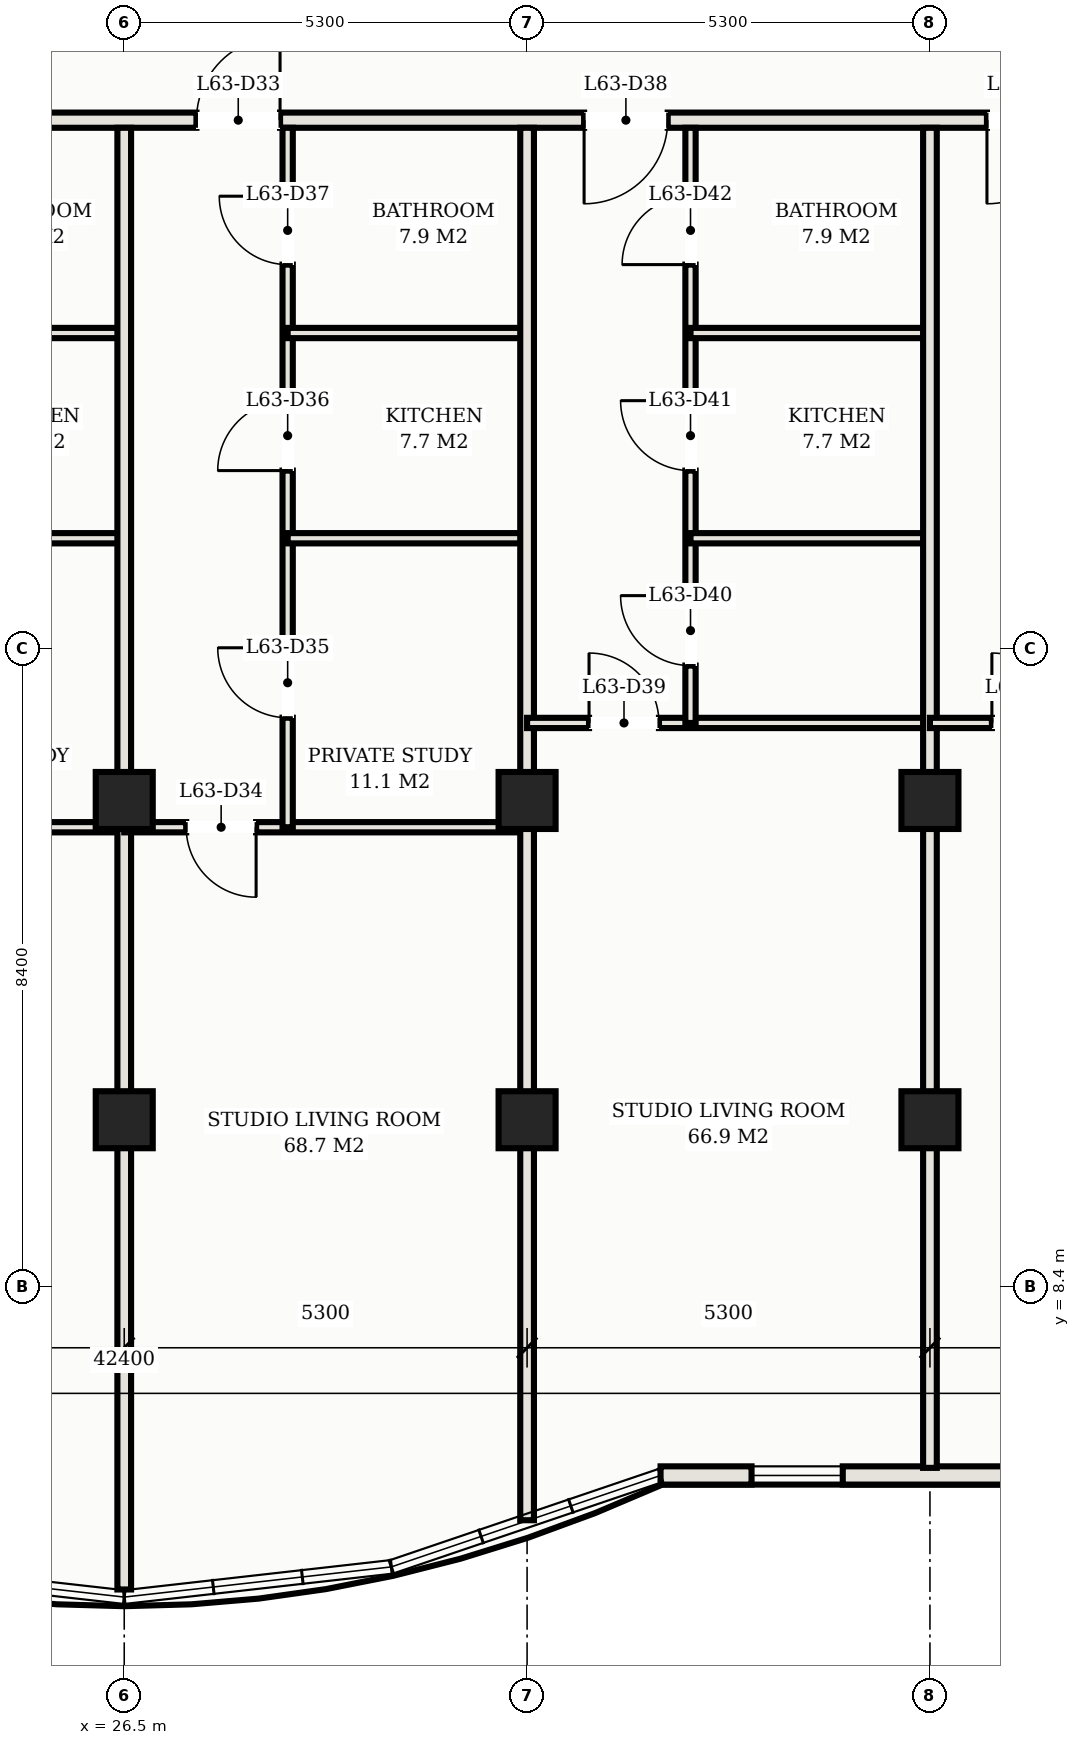
"""IFC4 building model, lengths in metres.
Left out: names, types, materials, properties, quantities, classifications, styles, units other than length and angle.
Written with IfcOpenShell. Run it as: python <this file> out.ifc"""

import sys

from ifc_helpers import new_model, si_unit, direction, frame, frame_2d, origin, origin_2d, place, context, subcontext, project, spatial, rectangle, hollow_rectangle, extrude, element, fill, save


model = new_model("IFC4")
c1 = context("Model", 3, precision=1e-05, world=origin(), true_north=direction((0.0, 1.0)))
c2 = subcontext(c1, "Body", "Model", "MODEL_VIEW")
j1 = project(units=[si_unit("LENGTHUNIT", "METRE"), si_unit("PLANEANGLEUNIT", "RADIAN")], contexts=[c1])
p1 = place(None, origin())
s1 = spatial("IfcSite", under=j1, at=p1, CompositionType="ELEMENT")
p2 = place(p1, origin())
s2 = spatial("IfcBuilding", under=s1, at=p2, CompositionType="ELEMENT")
p3 = place(p2, frame((0.0, 0.0, 229.7)))
s3 = spatial("IfcBuildingStorey", under=s2, at=p3, CompositionType="ELEMENT", Elevation=229.7)
for number, where, z_axis, x_axis in (
    (1, (26.5, 14.8, 0.0), (0.0, 0.0, 1.0), (1.0, 0.0, 0.0)),
    (2, (26.5, 10.6, 0.0), (0.0, 0.0, 1.0), (1.0, 0.0, 0.0)),
    (3, (31.8, 14.8, 0.0), (0.0, 0.0, 1.0), (1.0, 0.0, 0.0)),
    (4, (31.8, 10.6, 0.0), (0.0, 0.0, 1.0), (1.0, 0.0, 0.0)),
    (5, (37.1, 14.8, 0.0), (0.0, 0.0, 1.0), (1.0, 0.0, 0.0)),
    (6, (37.1, 10.6, 0.0), (0.0, 0.0, 1.0), (1.0, 0.0, 0.0)),
):
    element("IfcColumn", number, at=place(p3, frame(where, z_axis=z_axis, x_axis=x_axis)), inside=s3, PredefinedType="COLUMN", context=c2, shape_type="SweptSolid", body=[
        extrude(hollow_rectangle(XDim=0.75, YDim=0.75, WallThickness=0.025, at=origin_2d()), origin(), (0.0, 0.0, 1.0), 3.3),
    ])
p4 = place(p3, frame((33.556, 5.92, 0.0), z_axis=(0.0, 0.0, 1.0), x_axis=(1.0, 0.0, 0.0)))
e7 = element("IfcWall", 7, at=p4, inside=s3, PredefinedType="SOLIDWALL", context=c2, shape_type="SweptSolid", body=[
    extrude(rectangle(XDim=8.124, YDim=0.24, at=frame_2d((4.062, 0.0))), origin(), (0.0, 0.0, 1.0), 3.11),
])
p5 = place(p4, frame((4.909, 0.0, 0.75)))
e8 = element("IfcOpeningElement", 8, at=p5, cuts=e7, PredefinedType="OPENING", context=c2, shape_type="SweptSolid", body=[
    extrude(rectangle(XDim=1.8, YDim=1.7, at=frame_2d((0.9, 0.85))), frame((0.0, 0.13, 0.0), z_axis=(0.0, -1.0, 0.0), x_axis=(1.0, 0.0, 0.0)), (0.0, 0.0, 1.0), 0.26),
])
p6 = place(p4, frame((1.197, 0.0, 0.75)))
e9 = element("IfcOpeningElement", 9, at=p6, cuts=e7, PredefinedType="OPENING", context=c2, shape_type="SweptSolid", body=[
    extrude(rectangle(XDim=1.2, YDim=1.5, at=frame_2d((0.6, 0.75))), frame((0.0, 0.13, 0.0), z_axis=(0.0, -1.0, 0.0), x_axis=(1.0, 0.0, 0.0)), (0.0, 0.0, 1.0), 0.26),
])
p7 = place(p3, frame((6.72, 23.75, 0.0), z_axis=(0.0, 0.0, 1.0), x_axis=(1.0, 0.0, 0.0)))
e10 = element("IfcWall", 10, at=p7, inside=s3, PredefinedType="PARTITIONING", context=c2, shape_type="SweptSolid", body=[
    extrude(rectangle(XDim=39.56, YDim=0.2, at=frame_2d((19.78, 0.0))), origin(), (0.0, 0.0, 1.0), 2.43),
])
p8 = place(p7, frame((4.63, 0.0, 0.0)))
e11 = element("IfcOpeningElement", 11, at=p8, cuts=e10, PredefinedType="OPENING", context=c2, shape_type="SweptSolid", body=[
    extrude(rectangle(XDim=1.1, YDim=2.25, at=frame_2d((0.55, 1.125))), frame((0.0, 0.11, 0.0), z_axis=(0.0, -1.0, 0.0), x_axis=(1.0, 0.0, 0.0)), (0.0, 0.0, 1.0), 0.22),
])
p9 = place(p7, frame((9.93, 0.0, 0.0)))
e12 = element("IfcOpeningElement", 12, at=p9, cuts=e10, PredefinedType="OPENING", context=c2, shape_type="SweptSolid", body=[
    extrude(rectangle(XDim=1.1, YDim=2.25, at=frame_2d((0.55, 1.125))), frame((0.0, 0.11, 0.0), z_axis=(0.0, -1.0, 0.0), x_axis=(1.0, 0.0, 0.0)), (0.0, 0.0, 1.0), 0.22),
])
p10 = place(p7, frame((15.23, 0.0, 0.0)))
e13 = element("IfcOpeningElement", 13, at=p10, cuts=e10, PredefinedType="OPENING", context=c2, shape_type="SweptSolid", body=[
    extrude(rectangle(XDim=1.1, YDim=2.25, at=frame_2d((0.55, 1.125))), frame((0.0, 0.11, 0.0), z_axis=(0.0, -1.0, 0.0), x_axis=(1.0, 0.0, 0.0)), (0.0, 0.0, 1.0), 0.22),
])
p11 = place(p7, frame((20.73, 0.0, 0.0)))
e14 = element("IfcOpeningElement", 14, at=p11, cuts=e10, PredefinedType="OPENING", context=c2, shape_type="SweptSolid", body=[
    extrude(rectangle(XDim=1.1, YDim=2.25, at=frame_2d((0.55, 1.125))), frame((0.0, 0.11, 0.0), z_axis=(0.0, -1.0, 0.0), x_axis=(1.0, 0.0, 0.0)), (0.0, 0.0, 1.0), 0.22),
])
p12 = place(p7, frame((25.83, 0.0, 0.0)))
e15 = element("IfcOpeningElement", 15, at=p12, cuts=e10, PredefinedType="OPENING", context=c2, shape_type="SweptSolid", body=[
    extrude(rectangle(XDim=1.1, YDim=2.25, at=frame_2d((0.55, 1.125))), frame((0.0, 0.11, 0.0), z_axis=(0.0, -1.0, 0.0), x_axis=(1.0, 0.0, 0.0)), (0.0, 0.0, 1.0), 0.22),
])
p13 = place(p7, frame((31.13, 0.0, 0.0)))
e16 = element("IfcOpeningElement", 16, at=p13, cuts=e10, PredefinedType="OPENING", context=c2, shape_type="SweptSolid", body=[
    extrude(rectangle(XDim=1.1, YDim=2.25, at=frame_2d((0.55, 1.125))), frame((0.0, 0.11, 0.0), z_axis=(0.0, -1.0, 0.0), x_axis=(1.0, 0.0, 0.0)), (0.0, 0.0, 1.0), 0.22),
])
p14 = place(p7, frame((2.085, 0.0, 0.0)))
e17 = element("IfcOpeningElement", 17, at=p14, cuts=e10, PredefinedType="OPENING", context=c2, shape_type="SweptSolid", body=[
    extrude(rectangle(XDim=0.92, YDim=2.15, at=frame_2d((0.46, 1.075))), frame((0.0, 0.11, 0.0), z_axis=(0.0, -1.0, 0.0), x_axis=(1.0, 0.0, 0.0)), (0.0, 0.0, 1.0), 0.22),
])
p15 = place(p7, frame((36.555, 0.0, 0.0)))
e18 = element("IfcOpeningElement", 18, at=p15, cuts=e10, PredefinedType="OPENING", context=c2, shape_type="SweptSolid", body=[
    extrude(rectangle(XDim=0.92, YDim=2.15, at=frame_2d((0.46, 1.075))), frame((0.0, 0.11, 0.0), z_axis=(0.0, -1.0, 0.0), x_axis=(1.0, 0.0, 0.0)), (0.0, 0.0, 1.0), 0.22),
])
p16 = place(p3, frame((21.2, 14.448, 0.0), z_axis=(0.0, 0.0, 1.0), x_axis=(1.0, 0.0, 0.0)))
e19 = element("IfcWall", 19, at=p16, inside=s3, PredefinedType="PARTITIONING", context=c2, shape_type="SweptSolid", body=[
    extrude(rectangle(XDim=5.3, YDim=0.135, at=frame_2d((2.65, 0.0))), origin(), (0.0, 0.0, 1.0), 2.43),
])
p17 = place(p16, frame((0.815, 0.0, 0.0)))
e20 = element("IfcOpeningElement", 20, at=p17, cuts=e19, PredefinedType="OPENING", context=c2, shape_type="SweptSolid", body=[
    extrude(rectangle(XDim=0.92, YDim=2.15, at=frame_2d((0.46, 1.075))), frame((0.0, 0.078, 0.0), z_axis=(0.0, -1.0, 0.0), x_axis=(1.0, 0.0, 0.0)), (0.0, 0.0, 1.0), 0.155),
])
for number, where, z_axis, x_axis in (
    (21, (23.35, 18.25, 0.0), (0.0, 0.0, 1.0), (1.0, 0.0, 0.0)),
    (22, (23.35, 20.95, 0.0), (0.0, 0.0, 1.0), (1.0, 0.0, 0.0)),
):
    element("IfcWall", number, at=place(p3, frame(where, z_axis=z_axis, x_axis=x_axis)), inside=s3, PredefinedType="PARTITIONING", context=c2, shape_type="SweptSolid", body=[
        extrude(rectangle(XDim=3.15, YDim=0.135, at=frame_2d((1.575, 0.0))), origin(), (0.0, 0.0, 1.0), 2.43),
    ])
p18 = place(p3, frame((26.5, 4.42, 0.0), z_axis=(0.0, 0.0, 1.0), x_axis=(0.0, 1.0, 0.0)))
e23 = element("IfcWall", 23, at=p18, inside=s3, PredefinedType="PARTITIONING", context=c2, shape_type="SweptSolid", body=[
    extrude(rectangle(XDim=19.23, YDim=0.18, at=frame_2d((9.615, 0.0))), origin(), (0.0, 0.0, 1.0), 2.43),
])
p19 = place(p3, frame((26.5, 14.448, 0.0), z_axis=(0.0, 0.0, 1.0), x_axis=(1.0, 0.0, 0.0)))
e24 = element("IfcWall", 24, at=p19, inside=s3, PredefinedType="PARTITIONING", context=c2, shape_type="SweptSolid", body=[
    extrude(rectangle(XDim=5.3, YDim=0.135, at=frame_2d((2.65, 0.0))), origin(), (0.0, 0.0, 1.0), 2.43),
])
p20 = place(p19, frame((0.815, 0.0, 0.0)))
e25 = element("IfcOpeningElement", 25, at=p20, cuts=e24, PredefinedType="OPENING", context=c2, shape_type="SweptSolid", body=[
    extrude(rectangle(XDim=0.92, YDim=2.15, at=frame_2d((0.46, 1.075))), frame((0.0, 0.078, 0.0), z_axis=(0.0, -1.0, 0.0), x_axis=(1.0, 0.0, 0.0)), (0.0, 0.0, 1.0), 0.155),
])
p21 = place(p3, frame((28.65, 14.448, 0.0), z_axis=(0.0, 0.0, 1.0), x_axis=(0.0, 1.0, 0.0)))
e26 = element("IfcWall", 26, at=p21, inside=s3, PredefinedType="PARTITIONING", context=c2, shape_type="SweptSolid", body=[
    extrude(rectangle(XDim=9.202, YDim=0.135, at=frame_2d((4.601, 0.0))), origin(), (0.0, 0.0, 1.0), 2.43),
])
p22 = place(p21, frame((1.441, 0.0, 0.0)))
e27 = element("IfcOpeningElement", 27, at=p22, cuts=e26, PredefinedType="OPENING", context=c2, shape_type="SweptSolid", body=[
    extrude(rectangle(XDim=0.92, YDim=2.15, at=frame_2d((0.46, 1.075))), frame((0.0, 0.078, 0.0), z_axis=(0.0, -1.0, 0.0), x_axis=(1.0, 0.0, 0.0)), (0.0, 0.0, 1.0), 0.155),
])
p23 = place(p21, frame((4.692, 0.0, 0.0)))
e28 = element("IfcOpeningElement", 28, at=p23, cuts=e26, PredefinedType="OPENING", context=c2, shape_type="SweptSolid", body=[
    extrude(rectangle(XDim=0.92, YDim=2.15, at=frame_2d((0.46, 1.075))), frame((0.0, 0.078, 0.0), z_axis=(0.0, -1.0, 0.0), x_axis=(1.0, 0.0, 0.0)), (0.0, 0.0, 1.0), 0.155),
])
p24 = place(p21, frame((7.402, 0.0, 0.0)))
e29 = element("IfcOpeningElement", 29, at=p24, cuts=e26, PredefinedType="OPENING", context=c2, shape_type="SweptSolid", body=[
    extrude(rectangle(XDim=0.9, YDim=2.15, at=frame_2d((0.45, 1.075))), frame((0.0, 0.078, 0.0), z_axis=(0.0, -1.0, 0.0), x_axis=(1.0, 0.0, 0.0)), (0.0, 0.0, 1.0), 0.155),
])
for number, where, z_axis, x_axis in (
    (30, (28.65, 18.25, 0.0), (0.0, 0.0, 1.0), (1.0, 0.0, 0.0)),
    (31, (28.65, 20.95, 0.0), (0.0, 0.0, 1.0), (1.0, 0.0, 0.0)),
):
    element("IfcWall", number, at=place(p3, frame(where, z_axis=z_axis, x_axis=x_axis)), inside=s3, PredefinedType="PARTITIONING", context=c2, shape_type="SweptSolid", body=[
        extrude(rectangle(XDim=3.15, YDim=0.135, at=frame_2d((1.575, 0.0))), origin(), (0.0, 0.0, 1.0), 2.43),
    ])
p25 = place(p3, frame((31.8, 5.331, 0.0), z_axis=(0.0, 0.0, 1.0), x_axis=(0.0, 1.0, 0.0)))
e32 = element("IfcWall", 32, at=p25, inside=s3, PredefinedType="PARTITIONING", context=c2, shape_type="SweptSolid", body=[
    extrude(rectangle(XDim=18.319, YDim=0.18, at=frame_2d((9.159, 0.0))), origin(), (0.0, 0.0, 1.0), 2.43),
])
p26 = place(p3, frame((31.8, 15.82, 0.0), z_axis=(0.0, 0.0, 1.0), x_axis=(1.0, 0.0, 0.0)))
e33 = element("IfcWall", 33, at=p26, inside=s3, PredefinedType="PARTITIONING", context=c2, shape_type="SweptSolid", body=[
    extrude(rectangle(XDim=5.3, YDim=0.135, at=frame_2d((2.65, 0.0))), origin(), (0.0, 0.0, 1.0), 2.43),
])
p27 = place(p26, frame((0.815, 0.0, 0.0)))
e34 = element("IfcOpeningElement", 34, at=p27, cuts=e33, PredefinedType="OPENING", context=c2, shape_type="SweptSolid", body=[
    extrude(rectangle(XDim=0.92, YDim=2.15, at=frame_2d((0.46, 1.075))), frame((0.0, 0.078, 0.0), z_axis=(0.0, -1.0, 0.0), x_axis=(1.0, 0.0, 0.0)), (0.0, 0.0, 1.0), 0.155),
])
p28 = place(p3, frame((33.95, 15.82, 0.0), z_axis=(0.0, 0.0, 1.0), x_axis=(0.0, 1.0, 0.0)))
e35 = element("IfcWall", 35, at=p28, inside=s3, PredefinedType="PARTITIONING", context=c2, shape_type="SweptSolid", body=[
    extrude(rectangle(XDim=7.83, YDim=0.135, at=frame_2d((3.915, 0.0))), origin(), (0.0, 0.0, 1.0), 2.43),
])
p29 = place(p28, frame((0.755, 0.0, 0.0)))
e36 = element("IfcOpeningElement", 36, at=p29, cuts=e35, PredefinedType="OPENING", context=c2, shape_type="SweptSolid", body=[
    extrude(rectangle(XDim=0.92, YDim=2.15, at=frame_2d((0.46, 1.075))), frame((0.0, 0.078, 0.0), z_axis=(0.0, -1.0, 0.0), x_axis=(1.0, 0.0, 0.0)), (0.0, 0.0, 1.0), 0.155),
])
p30 = place(p28, frame((3.32, 0.0, 0.0)))
e37 = element("IfcOpeningElement", 37, at=p30, cuts=e35, PredefinedType="OPENING", context=c2, shape_type="SweptSolid", body=[
    extrude(rectangle(XDim=0.92, YDim=2.15, at=frame_2d((0.46, 1.075))), frame((0.0, 0.078, 0.0), z_axis=(0.0, -1.0, 0.0), x_axis=(1.0, 0.0, 0.0)), (0.0, 0.0, 1.0), 0.155),
])
p31 = place(p28, frame((6.03, 0.0, 0.0)))
e38 = element("IfcOpeningElement", 38, at=p31, cuts=e35, PredefinedType="OPENING", context=c2, shape_type="SweptSolid", body=[
    extrude(rectangle(XDim=0.9, YDim=2.15, at=frame_2d((0.45, 1.075))), frame((0.0, 0.078, 0.0), z_axis=(0.0, -1.0, 0.0), x_axis=(1.0, 0.0, 0.0)), (0.0, 0.0, 1.0), 0.155),
])
for number, where, z_axis, x_axis in (
    (39, (33.95, 18.25, 0.0), (0.0, 0.0, 1.0), (1.0, 0.0, 0.0)),
    (40, (33.95, 20.95, 0.0), (0.0, 0.0, 1.0), (1.0, 0.0, 0.0)),
):
    element("IfcWall", number, at=place(p3, frame(where, z_axis=z_axis, x_axis=x_axis)), inside=s3, PredefinedType="PARTITIONING", context=c2, shape_type="SweptSolid", body=[
        extrude(rectangle(XDim=3.15, YDim=0.135, at=frame_2d((1.575, 0.0))), origin(), (0.0, 0.0, 1.0), 2.43),
    ])
p32 = place(p3, frame((37.1, 6.02, 0.0), z_axis=(0.0, 0.0, 1.0), x_axis=(0.0, 1.0, 0.0)))
e41 = element("IfcWall", 41, at=p32, inside=s3, PredefinedType="PARTITIONING", context=c2, shape_type="SweptSolid", body=[
    extrude(rectangle(XDim=17.63, YDim=0.18, at=frame_2d((8.815, 0.0))), origin(), (0.0, 0.0, 1.0), 2.43),
])
p33 = place(p3, frame((37.1, 15.82, 0.0), z_axis=(0.0, 0.0, 1.0), x_axis=(1.0, 0.0, 0.0)))
e42 = element("IfcWall", 42, at=p33, inside=s3, PredefinedType="PARTITIONING", context=c2, shape_type="SweptSolid", body=[
    extrude(rectangle(XDim=5.3, YDim=0.135, at=frame_2d((2.65, 0.0))), origin(), (0.0, 0.0, 1.0), 2.43),
])
p34 = place(p33, frame((0.815, 0.0, 0.0)))
e43 = element("IfcOpeningElement", 43, at=p34, cuts=e42, PredefinedType="OPENING", context=c2, shape_type="SweptSolid", body=[
    extrude(rectangle(XDim=0.92, YDim=2.15, at=frame_2d((0.46, 1.075))), frame((0.0, 0.078, 0.0), z_axis=(0.0, -1.0, 0.0), x_axis=(1.0, 0.0, 0.0)), (0.0, 0.0, 1.0), 0.155),
])
p35 = place(p11, origin())
e44 = element("IfcDoor", 44, at=p35, inside=s3, OperationType="SINGLE_SWING_RIGHT", PredefinedType="DOOR", context=c2, shape_type="SweptSolid", body=[
    extrude(rectangle(XDim=1.1, YDim=2.25, at=frame_2d((0.55, 1.125))), frame((0.0, 0.025, 0.0), z_axis=(0.0, -1.0, 0.0), x_axis=(1.0, 0.0, 0.0)), (0.0, 0.0, 1.0), 0.05),
])
fill(e14, e44)
p36 = place(p20, frame((0.92, 0.0, 0.0), z_axis=(0.0, 0.0, 1.0), x_axis=(-1.0, 0.0, 0.0)))
e45 = element("IfcDoor", 45, at=p36, inside=s3, OperationType="SINGLE_SWING_LEFT", PredefinedType="DOOR", context=c2, shape_type="SweptSolid", body=[
    extrude(rectangle(XDim=0.92, YDim=2.15, at=frame_2d((0.46, 1.075))), frame((0.0, 0.025, 0.0), z_axis=(0.0, -1.0, 0.0), x_axis=(1.0, 0.0, 0.0)), (0.0, 0.0, 1.0), 0.05),
])
fill(e25, e45)
p37 = place(p22, origin())
e46 = element("IfcDoor", 46, at=p37, inside=s3, OperationType="SINGLE_SWING_RIGHT", PredefinedType="DOOR", context=c2, shape_type="SweptSolid", body=[
    extrude(rectangle(XDim=0.92, YDim=2.15, at=frame_2d((0.46, 1.075))), frame((0.0, 0.025, 0.0), z_axis=(0.0, -1.0, 0.0), x_axis=(1.0, 0.0, 0.0)), (0.0, 0.0, 1.0), 0.05),
])
fill(e27, e46)
p38 = place(p23, origin())
e47 = element("IfcDoor", 47, at=p38, inside=s3, OperationType="SINGLE_SWING_LEFT", PredefinedType="DOOR", context=c2, shape_type="SweptSolid", body=[
    extrude(rectangle(XDim=0.92, YDim=2.15, at=frame_2d((0.46, 1.075))), frame((0.0, 0.025, 0.0), z_axis=(0.0, -1.0, 0.0), x_axis=(1.0, 0.0, 0.0)), (0.0, 0.0, 1.0), 0.05),
])
fill(e28, e47)
p39 = place(p24, origin())
e48 = element("IfcDoor", 48, at=p39, inside=s3, OperationType="SINGLE_SWING_RIGHT", PredefinedType="DOOR", context=c2, shape_type="SweptSolid", body=[
    extrude(rectangle(XDim=0.9, YDim=2.15, at=frame_2d((0.45, 1.075))), frame((0.0, 0.025, 0.0), z_axis=(0.0, -1.0, 0.0), x_axis=(1.0, 0.0, 0.0)), (0.0, 0.0, 1.0), 0.05),
])
fill(e29, e48)
p40 = place(p12, frame((1.1, 0.0, 0.0), z_axis=(0.0, 0.0, 1.0), x_axis=(-1.0, 0.0, 0.0)))
e49 = element("IfcDoor", 49, at=p40, inside=s3, OperationType="SINGLE_SWING_RIGHT", PredefinedType="DOOR", context=c2, shape_type="SweptSolid", body=[
    extrude(rectangle(XDim=1.1, YDim=2.25, at=frame_2d((0.55, 1.125))), frame((0.0, 0.025, 0.0), z_axis=(0.0, -1.0, 0.0), x_axis=(1.0, 0.0, 0.0)), (0.0, 0.0, 1.0), 0.05),
])
fill(e15, e49)
p41 = place(p27, origin())
e50 = element("IfcDoor", 50, at=p41, inside=s3, OperationType="SINGLE_SWING_LEFT", PredefinedType="DOOR", context=c2, shape_type="SweptSolid", body=[
    extrude(rectangle(XDim=0.92, YDim=2.15, at=frame_2d((0.46, 1.075))), frame((0.0, 0.025, 0.0), z_axis=(0.0, -1.0, 0.0), x_axis=(1.0, 0.0, 0.0)), (0.0, 0.0, 1.0), 0.05),
])
fill(e34, e50)
p42 = place(p29, origin())
e51 = element("IfcDoor", 51, at=p42, inside=s3, OperationType="SINGLE_SWING_RIGHT", PredefinedType="DOOR", context=c2, shape_type="SweptSolid", body=[
    extrude(rectangle(XDim=0.92, YDim=2.15, at=frame_2d((0.46, 1.075))), frame((0.0, 0.025, 0.0), z_axis=(0.0, -1.0, 0.0), x_axis=(1.0, 0.0, 0.0)), (0.0, 0.0, 1.0), 0.05),
])
fill(e36, e51)
p43 = place(p30, origin())
e52 = element("IfcDoor", 52, at=p43, inside=s3, OperationType="SINGLE_SWING_RIGHT", PredefinedType="DOOR", context=c2, shape_type="SweptSolid", body=[
    extrude(rectangle(XDim=0.92, YDim=2.15, at=frame_2d((0.46, 1.075))), frame((0.0, 0.025, 0.0), z_axis=(0.0, -1.0, 0.0), x_axis=(1.0, 0.0, 0.0)), (0.0, 0.0, 1.0), 0.05),
])
fill(e37, e52)
p44 = place(p31, origin())
e53 = element("IfcDoor", 53, at=p44, inside=s3, OperationType="SINGLE_SWING_LEFT", PredefinedType="DOOR", context=c2, shape_type="SweptSolid", body=[
    extrude(rectangle(XDim=0.9, YDim=2.15, at=frame_2d((0.45, 1.075))), frame((0.0, 0.025, 0.0), z_axis=(0.0, -1.0, 0.0), x_axis=(1.0, 0.0, 0.0)), (0.0, 0.0, 1.0), 0.05),
])
fill(e38, e53)
p45 = place(p13, frame((1.1, 0.0, 0.0), z_axis=(0.0, 0.0, 1.0), x_axis=(-1.0, 0.0, 0.0)))
e54 = element("IfcDoor", 54, at=p45, inside=s3, OperationType="SINGLE_SWING_RIGHT", PredefinedType="DOOR", context=c2, shape_type="SweptSolid", body=[
    extrude(rectangle(XDim=1.1, YDim=2.25, at=frame_2d((0.55, 1.125))), frame((0.0, 0.025, 0.0), z_axis=(0.0, -1.0, 0.0), x_axis=(1.0, 0.0, 0.0)), (0.0, 0.0, 1.0), 0.05),
])
fill(e16, e54)
p46 = place(p34, origin())
e55 = element("IfcDoor", 55, at=p46, inside=s3, OperationType="SINGLE_SWING_LEFT", PredefinedType="DOOR", context=c2, shape_type="SweptSolid", body=[
    extrude(rectangle(XDim=0.92, YDim=2.15, at=frame_2d((0.46, 1.075))), frame((0.0, 0.025, 0.0), z_axis=(0.0, -1.0, 0.0), x_axis=(1.0, 0.0, 0.0)), (0.0, 0.0, 1.0), 0.05),
])
fill(e43, e55)
p47 = place(p6, origin())
e56 = element("IfcWindow", 56, at=p47, inside=s3, PartitioningType="SINGLE_PANEL", PredefinedType="WINDOW", context=c2, shape_type="SweptSolid", body=[
    extrude(rectangle(XDim=1.2, YDim=1.5, at=frame_2d((0.6, 0.75))), frame((0.0, 0.03, 0.0), z_axis=(0.0, -1.0, 0.0), x_axis=(1.0, 0.0, 0.0)), (0.0, 0.0, 1.0), 0.06),
])
fill(e9, e56)
save(model, sys.argv[1])
